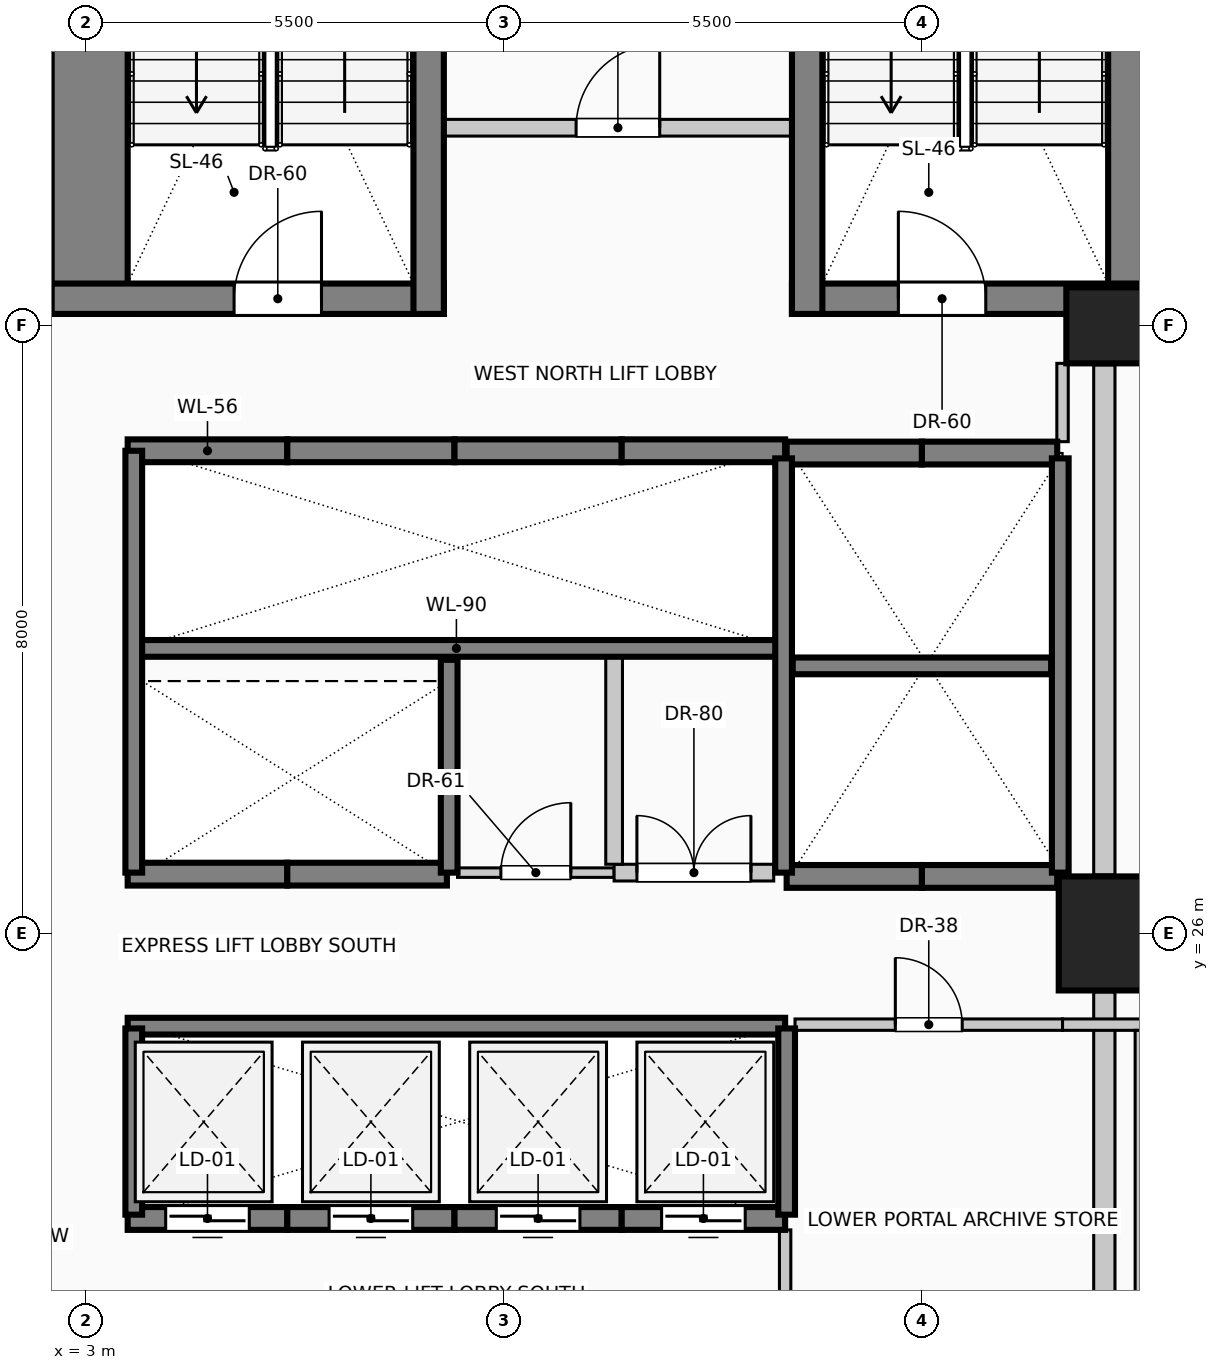
"""IFC4 building model, lengths in metres.
Left out: names, types, materials, properties, quantities, classifications, styles, units other than length and angle.
Written with IfcOpenShell. Run it as: python <this file> out.ifc"""

import sys

from ifc_helpers import new_model, si_unit, direction, frame, frame_2d, origin, origin_2d, place, context, subcontext, project, spatial, rectangle, circle, extrude, element, fill, save


model = new_model("IFC4")
c1 = context("Model", 3, precision=1e-05, world=origin(), true_north=direction((0.0, 1.0)))
c2 = subcontext(c1, "Body", "Model", "MODEL_VIEW")
j1 = project(units=[si_unit("LENGTHUNIT", "METRE"), si_unit("PLANEANGLEUNIT", "RADIAN")], contexts=[c1])
p1 = place(None, origin())
s1 = spatial("IfcSite", under=j1, at=p1, CompositionType="ELEMENT")
p2 = place(p1, origin())
s2 = spatial("IfcBuilding", under=s1, at=p2, CompositionType="ELEMENT")
p3 = place(p2, frame((0.0, 0.0, 30.6)))
s3 = spatial("IfcBuildingStorey", under=s2, at=p3, CompositionType="ELEMENT", Elevation=30.6)
for number, where, z_axis, x_axis in (
    (1, (3.05, 34.15, 0.0), (0.0, 0.0, 1.0), (0.0, 1.0, 0.0)),
    (2, (16.95, 34.15, 0.0), (0.0, 0.0, 1.0), (0.0, 1.0, 0.0)),
):
    element("IfcWall", number, at=place(p3, frame(where, z_axis=z_axis, x_axis=x_axis)), inside=s3, PredefinedType="SHEAR", context=c2, shape_type="SweptSolid", body=[
        extrude(rectangle(XDim=9.28, YDim=1.0, at=frame_2d((4.64, 0.0))), origin(), (0.0, 0.0, 1.0), 4.0),
    ])
p4 = place(p3, frame((2.55, 34.35, 0.0), z_axis=(0.0, 0.0, 1.0), x_axis=(1.0, 0.0, 0.0)))
e3 = element("IfcWall", 3, at=p4, inside=s3, PredefinedType="SHEAR", context=c2, shape_type="SweptSolid", body=[
    extrude(rectangle(XDim=5.16, YDim=0.4, at=frame_2d((2.58, 0.0))), origin(), (0.0, 0.0, 1.0), 4.0),
])
p5 = place(p4, frame((2.4, 0.0, 0.0)))
e4 = element("IfcOpeningElement", 4, at=p5, cuts=e3, PredefinedType="OPENING", context=c2, shape_type="SweptSolid", body=[
    extrude(rectangle(XDim=1.15, YDim=2.2, at=frame_2d((0.575, 1.1))), frame((0.0, 0.21, 0.0), z_axis=(0.0, -1.0, 0.0), x_axis=(1.0, 0.0, 0.0)), (0.0, 0.0, 1.0), 0.42),
])
p6 = place(p3, frame((12.29, 34.35, 0.0), z_axis=(0.0, 0.0, 1.0), x_axis=(1.0, 0.0, 0.0)))
e5 = element("IfcWall", 5, at=p6, inside=s3, PredefinedType="SHEAR", context=c2, shape_type="SweptSolid", body=[
    extrude(rectangle(XDim=5.16, YDim=0.4, at=frame_2d((2.58, 0.0))), origin(), (0.0, 0.0, 1.0), 4.0),
])
p7 = place(p6, frame((1.4, 0.0, 0.0)))
e6 = element("IfcOpeningElement", 6, at=p7, cuts=e5, PredefinedType="OPENING", context=c2, shape_type="SweptSolid", body=[
    extrude(rectangle(XDim=1.15, YDim=2.2, at=frame_2d((0.575, 1.1))), frame((0.0, 0.21, 0.0), z_axis=(0.0, -1.0, 0.0), x_axis=(1.0, 0.0, 0.0)), (0.0, 0.0, 1.0), 0.42),
])
for number, where, z_axis, x_axis in (
    (7, (7.51, 34.15, 0.0), (0.0, 0.0, 1.0), (0.0, 1.0, 0.0)),
    (8, (12.49, 34.15, 0.0), (0.0, 0.0, 1.0), (0.0, 1.0, 0.0)),
):
    element("IfcWall", number, at=place(p3, frame(where, z_axis=z_axis, x_axis=x_axis)), inside=s3, PredefinedType="SHEAR", context=c2, shape_type="SweptSolid", body=[
        extrude(rectangle(XDim=9.28, YDim=0.4, at=frame_2d((4.64, 0.0))), origin(), (0.0, 0.0, 1.0), 4.0),
    ])
p8 = place(p3, frame((16.4, 26.0, 0.0), z_axis=(0.0, 0.0, 1.0), x_axis=(1.0, 0.0, 0.0)))
e9 = element("IfcColumn", 9, at=p8, inside=s3, PredefinedType="COLUMN", context=c2, shape_type="SweptSolid", body=[
    extrude(rectangle(XDim=1.2, YDim=1.5, at=origin_2d()), origin(), (0.0, 0.0, 1.0), 4.0),
])
p9 = place(p3, frame((16.4, 34.0, 0.0), z_axis=(0.0, 0.0, 1.0), x_axis=(1.0, 0.0, 0.0)))
e10 = element("IfcColumn", 10, at=p9, inside=s3, PredefinedType="COLUMN", context=c2, shape_type="SweptSolid", body=[
    extrude(circle(Radius=0.5, at=origin_2d()), origin(), (0.0, 0.0, 1.0), 4.0),
])
p10 = place(p3, frame((16.4, 25.23, 0.0), z_axis=(0.0, 0.0, 1.0), x_axis=(0.0, -1.0, 0.0)))
e11 = element("IfcWall", 11, at=p10, inside=s3, PredefinedType="SOLIDWALL", context=c2, shape_type="SweptSolid", body=[
    extrude(rectangle(XDim=6.46, YDim=0.28, at=frame_2d((3.23, 0.0))), origin(), (0.0, 0.0, 1.0), 3.0),
])
p11 = place(p3, frame((16.4, 33.48, 0.0), z_axis=(0.0, 0.0, 1.0), x_axis=(0.0, -1.0, 0.0)))
e12 = element("IfcWall", 12, at=p11, inside=s3, PredefinedType="SOLIDWALL", context=c2, shape_type="SweptSolid", body=[
    extrude(rectangle(XDim=6.71, YDim=0.28, at=frame_2d((3.355, 0.0))), origin(), (0.0, 0.0, 1.0), 3.0),
])
p12 = place(p3, frame((5.65, 22.25, 0.0), z_axis=(0.0, 0.0, 1.0), x_axis=(-1.0, 0.0, 0.0)))
e13 = element("IfcWall", 13, at=p12, inside=s3, PredefinedType="SOLIDWALL", context=c2, shape_type="SweptSolid", body=[
    extrude(rectangle(XDim=2.1, YDim=0.3, at=frame_2d((1.05, 0.0))), origin(), (0.0, 0.0, 1.0), 4.0),
])
p13 = place(p12, frame((0.5, 0.0, 0.0)))
e14 = element("IfcOpeningElement", 14, at=p13, cuts=e13, PredefinedType="OPENING", context=c2, shape_type="SweptSolid", body=[
    extrude(rectangle(XDim=1.1, YDim=2.2, at=frame_2d((0.55, 1.1))), frame((0.0, 0.16, 0.0), z_axis=(0.0, -1.0, 0.0), x_axis=(1.0, 0.0, 0.0)), (0.0, 0.0, 1.0), 0.32),
])
p14 = place(p3, frame((7.85, 22.25, 0.0), z_axis=(0.0, 0.0, 1.0), x_axis=(-1.0, 0.0, 0.0)))
e15 = element("IfcWall", 15, at=p14, inside=s3, PredefinedType="SOLIDWALL", context=c2, shape_type="SweptSolid", body=[
    extrude(rectangle(XDim=2.2, YDim=0.3, at=frame_2d((1.1, 0.0))), origin(), (0.0, 0.0, 1.0), 4.0),
])
p15 = place(p14, frame((0.55, 0.0, 0.0)))
e16 = element("IfcOpeningElement", 16, at=p15, cuts=e15, PredefinedType="OPENING", context=c2, shape_type="SweptSolid", body=[
    extrude(rectangle(XDim=1.1, YDim=2.2, at=frame_2d((0.55, 1.1))), frame((0.0, 0.16, 0.0), z_axis=(0.0, -1.0, 0.0), x_axis=(1.0, 0.0, 0.0)), (0.0, 0.0, 1.0), 0.32),
])
p16 = place(p3, frame((10.05, 22.25, 0.0), z_axis=(0.0, 0.0, 1.0), x_axis=(-1.0, 0.0, 0.0)))
e17 = element("IfcWall", 17, at=p16, inside=s3, PredefinedType="SOLIDWALL", context=c2, shape_type="SweptSolid", body=[
    extrude(rectangle(XDim=2.2, YDim=0.3, at=frame_2d((1.1, 0.0))), origin(), (0.0, 0.0, 1.0), 4.0),
])
p17 = place(p16, frame((0.55, 0.0, 0.0)))
e18 = element("IfcOpeningElement", 18, at=p17, cuts=e17, PredefinedType="OPENING", context=c2, shape_type="SweptSolid", body=[
    extrude(rectangle(XDim=1.1, YDim=2.2, at=frame_2d((0.55, 1.1))), frame((0.0, 0.16, 0.0), z_axis=(0.0, -1.0, 0.0), x_axis=(1.0, 0.0, 0.0)), (0.0, 0.0, 1.0), 0.32),
])
p18 = place(p3, frame((12.2, 22.25, 0.0), z_axis=(0.0, 0.0, 1.0), x_axis=(-1.0, 0.0, 0.0)))
e19 = element("IfcWall", 19, at=p18, inside=s3, PredefinedType="SOLIDWALL", context=c2, shape_type="SweptSolid", body=[
    extrude(rectangle(XDim=2.15, YDim=0.3, at=frame_2d((1.075, 0.0))), origin(), (0.0, 0.0, 1.0), 4.0),
])
p19 = place(p18, frame((0.525, 0.0, 0.0)))
e20 = element("IfcOpeningElement", 20, at=p19, cuts=e19, PredefinedType="OPENING", context=c2, shape_type="SweptSolid", body=[
    extrude(rectangle(XDim=1.1, YDim=2.2, at=frame_2d((0.55, 1.1))), frame((0.0, 0.16, 0.0), z_axis=(0.0, -1.0, 0.0), x_axis=(1.0, 0.0, 0.0)), (0.0, 0.0, 1.0), 0.32),
])
for number, where, z_axis, x_axis in (
    (21, (14.0, 26.75, 0.0), (0.0, 0.0, 1.0), (-1.0, 0.0, 0.0)),
    (22, (15.78, 26.75, 0.0), (0.0, 0.0, 1.0), (-1.0, 0.0, 0.0)),
    (23, (12.22, 32.32, 0.0), (0.0, 0.0, 1.0), (1.0, 0.0, 0.0)),
    (24, (14.0, 32.32, 0.0), (0.0, 0.0, 1.0), (1.0, 0.0, 0.0)),
):
    element("IfcWall", number, at=place(p3, frame(where, z_axis=z_axis, x_axis=x_axis)), inside=s3, PredefinedType="SOLIDWALL", context=c2, shape_type="SweptSolid", body=[
        extrude(rectangle(XDim=1.78, YDim=0.3, at=frame_2d((0.89, 0.0))), origin(), (0.0, 0.0, 1.0), 4.0),
    ])
p20 = place(p3, frame((3.55, 32.35, 0.0), z_axis=(0.0, 0.0, 1.0), x_axis=(1.0, 0.0, 0.0)))
e25 = element("IfcWall", 25, at=p20, inside=s3, PredefinedType="SOLIDWALL", context=c2, shape_type="SweptSolid", body=[
    extrude(rectangle(XDim=2.1, YDim=0.3, at=frame_2d((1.05, 0.0))), origin(), (0.0, 0.0, 1.0), 4.0),
])
p21 = place(p3, frame((5.65, 32.35, 0.0), z_axis=(0.0, 0.0, 1.0), x_axis=(1.0, 0.0, 0.0)))
e26 = element("IfcWall", 26, at=p21, inside=s3, PredefinedType="SOLIDWALL", context=c2, shape_type="SweptSolid", body=[
    extrude(rectangle(XDim=2.2, YDim=0.3, at=frame_2d((1.1, 0.0))), origin(), (0.0, 0.0, 1.0), 4.0),
])
p22 = place(p3, frame((7.85, 32.35, 0.0), z_axis=(0.0, 0.0, 1.0), x_axis=(1.0, 0.0, 0.0)))
e27 = element("IfcWall", 27, at=p22, inside=s3, PredefinedType="SOLIDWALL", context=c2, shape_type="SweptSolid", body=[
    extrude(rectangle(XDim=2.2, YDim=0.3, at=frame_2d((1.1, 0.0))), origin(), (0.0, 0.0, 1.0), 4.0),
])
p23 = place(p3, frame((10.05, 32.35, 0.0), z_axis=(0.0, 0.0, 1.0), x_axis=(1.0, 0.0, 0.0)))
e28 = element("IfcWall", 28, at=p23, inside=s3, PredefinedType="SOLIDWALL", context=c2, shape_type="SweptSolid", body=[
    extrude(rectangle(XDim=2.15, YDim=0.3, at=frame_2d((1.075, 0.0))), origin(), (0.0, 0.0, 1.0), 4.0),
])
p24 = place(p3, frame((5.65, 26.78, 0.0), z_axis=(0.0, 0.0, 1.0), x_axis=(-1.0, 0.0, 0.0)))
e29 = element("IfcWall", 29, at=p24, inside=s3, PredefinedType="SOLIDWALL", context=c2, shape_type="SweptSolid", body=[
    extrude(rectangle(XDim=2.1, YDim=0.3, at=frame_2d((1.05, 0.0))), origin(), (0.0, 0.0, 1.0), 4.0),
])
p25 = place(p3, frame((7.75, 26.78, 0.0), z_axis=(0.0, 0.0, 1.0), x_axis=(-1.0, 0.0, 0.0)))
e30 = element("IfcWall", 30, at=p25, inside=s3, PredefinedType="SOLIDWALL", context=c2, shape_type="SweptSolid", body=[
    extrude(rectangle(XDim=2.1, YDim=0.3, at=frame_2d((1.05, 0.0))), origin(), (0.0, 0.0, 1.0), 4.0),
])
p26 = place(p3, frame((3.55, 29.75, 0.0), z_axis=(0.0, 0.0, 1.0), x_axis=(1.0, 0.0, 0.0)))
e31 = element("IfcWall", 31, at=p26, inside=s3, PredefinedType="SOLIDWALL", context=c2, shape_type="SweptSolid", body=[
    extrude(rectangle(XDim=8.65, YDim=0.22, at=frame_2d((4.325, 0.0))), origin(), (0.0, 0.0, 1.0), 4.0),
])
p27 = place(p3, frame((3.63, 26.8, 0.0), z_axis=(0.0, 0.0, 1.0), x_axis=(0.0, 1.0, 0.0)))
e32 = element("IfcWall", 32, at=p27, inside=s3, PredefinedType="SOLIDWALL", context=c2, shape_type="SweptSolid", body=[
    extrude(rectangle(XDim=5.55, YDim=0.22, at=frame_2d((2.775, 0.0))), origin(), (0.0, 0.0, 1.0), 4.0),
])
p28 = place(p3, frame((7.78, 26.8, 0.0), z_axis=(0.0, 0.0, 1.0), x_axis=(0.0, 1.0, 0.0)))
e33 = element("IfcWall", 33, at=p28, inside=s3, PredefinedType="SOLIDWALL", context=c2, shape_type="SweptSolid", body=[
    extrude(rectangle(XDim=2.8, YDim=0.22, at=frame_2d((1.4, 0.0))), origin(), (0.0, 0.0, 1.0), 4.0),
])
for number, where, z_axis, x_axis in (
    (34, (12.18, 26.8, 0.0), (0.0, 0.0, 1.0), (0.0, 1.0, 0.0)),
    (35, (15.82, 26.8, 0.0), (0.0, 0.0, 1.0), (0.0, 1.0, 0.0)),
):
    element("IfcWall", number, at=place(p3, frame(where, z_axis=z_axis, x_axis=x_axis)), inside=s3, PredefinedType="SOLIDWALL", context=c2, shape_type="SweptSolid", body=[
        extrude(rectangle(XDim=5.45, YDim=0.22, at=frame_2d((2.725, 0.0))), origin(), (0.0, 0.0, 1.0), 4.0),
    ])
p29 = place(p3, frame((12.3, 29.52, 0.0), z_axis=(0.0, 0.0, 1.0), x_axis=(1.0, 0.0, 0.0)))
e36 = element("IfcWall", 36, at=p29, inside=s3, PredefinedType="SOLIDWALL", context=c2, shape_type="SweptSolid", body=[
    extrude(rectangle(XDim=3.4, YDim=0.22, at=frame_2d((1.7, 0.0))), origin(), (0.0, 0.0, 1.0), 4.0),
])
p30 = place(p3, frame((3.55, 24.78, 0.0), z_axis=(0.0, 0.0, 1.0), x_axis=(1.0, 0.0, 0.0)))
e37 = element("IfcWall", 37, at=p30, inside=s3, PredefinedType="SOLIDWALL", context=c2, shape_type="SweptSolid", body=[
    extrude(rectangle(XDim=8.65, YDim=0.22, at=frame_2d((4.325, 0.0))), origin(), (0.0, 0.0, 1.0), 4.0),
])
for number, where, z_axis, x_axis in (
    (38, (3.63, 22.3, 0.0), (0.0, 0.0, 1.0), (0.0, 1.0, 0.0)),
    (39, (12.22, 22.3, 0.0), (0.0, 0.0, 1.0), (0.0, 1.0, 0.0)),
):
    element("IfcWall", number, at=place(p3, frame(where, z_axis=z_axis, x_axis=x_axis)), inside=s3, PredefinedType="SOLIDWALL", context=c2, shape_type="SweptSolid", body=[
        extrude(rectangle(XDim=2.45, YDim=0.22, at=frame_2d((1.225, 0.0))), origin(), (0.0, 0.0, 1.0), 4.0),
    ])
p31 = place(p3, frame((7.51, 36.6, 0.0), z_axis=(0.0, 0.0, 1.0), x_axis=(1.0, 0.0, 0.0)))
e40 = element("IfcWall", 40, at=p31, inside=s3, PredefinedType="PARTITIONING", context=c2, shape_type="SweptSolid", body=[
    extrude(rectangle(XDim=4.98, YDim=0.22, at=frame_2d((2.49, 0.0))), origin(), (0.0, 0.0, 1.0), 3.7),
])
p32 = place(p31, frame((1.94, 0.0, 0.0)))
e41 = element("IfcOpeningElement", 41, at=p32, cuts=e40, PredefinedType="OPENING", context=c2, shape_type="SweptSolid", body=[
    extrude(rectangle(XDim=1.1, YDim=2.2, at=frame_2d((0.55, 1.1))), frame((0.0, 0.12, 0.0), z_axis=(0.0, -1.0, 0.0), x_axis=(1.0, 0.0, 0.0)), (0.0, 0.0, 1.0), 0.24),
])
p33 = place(p3, frame((12.33, 24.8, 0.0), z_axis=(0.0, 0.0, 1.0), x_axis=(1.0, 0.0, 0.0)))
e42 = element("IfcWall", 42, at=p33, inside=s3, PredefinedType="PARTITIONING", context=c2, shape_type="SweptSolid", body=[
    extrude(rectangle(XDim=3.52, YDim=0.15, at=frame_2d((1.76, 0.0))), origin(), (0.0, 0.0, 1.0), 3.7),
])
p34 = place(p33, frame((1.32, 0.0, 0.0)))
e43 = element("IfcOpeningElement", 43, at=p34, cuts=e42, PredefinedType="OPENING", context=c2, shape_type="SweptSolid", body=[
    extrude(rectangle(XDim=0.88, YDim=2.1, at=frame_2d((0.44, 1.05))), frame((0.0, 0.085, 0.0), z_axis=(0.0, -1.0, 0.0), x_axis=(1.0, 0.0, 0.0)), (0.0, 0.0, 1.0), 0.17),
])
p35 = place(p3, frame((15.85, 24.8, 0.0), z_axis=(0.0, 0.0, 1.0), x_axis=(1.0, 0.0, 0.0)))
e44 = element("IfcWall", 44, at=p35, inside=s3, PredefinedType="PARTITIONING", context=c2, shape_type="SweptSolid", body=[
    extrude(rectangle(XDim=1.03, YDim=0.15, at=frame_2d((0.515, 0.0))), origin(), (0.0, 0.0, 1.0), 3.7),
])
p36 = place(p3, frame((7.89, 26.8, 0.0), z_axis=(0.0, 0.0, 1.0), x_axis=(1.0, 0.0, 0.0)))
e45 = element("IfcWall", 45, at=p36, inside=s3, PredefinedType="PARTITIONING", context=c2, shape_type="SweptSolid", body=[
    extrude(rectangle(XDim=2.06, YDim=0.125, at=frame_2d((1.03, 0.0))), origin(), (0.0, 0.0, 1.0), 3.7),
])
p37 = place(p36, frame((0.57, 0.0, 0.0)))
e46 = element("IfcOpeningElement", 46, at=p37, cuts=e45, PredefinedType="OPENING", context=c2, shape_type="SweptSolid", body=[
    extrude(rectangle(XDim=0.92, YDim=2.1, at=frame_2d((0.46, 1.05))), frame((0.0, 0.073, 0.0), z_axis=(0.0, -1.0, 0.0), x_axis=(1.0, 0.0, 0.0)), (0.0, 0.0, 1.0), 0.145),
])
p38 = place(p3, frame((9.95, 26.8, 0.0), z_axis=(0.0, 0.0, 1.0), x_axis=(1.0, 0.0, 0.0)))
e47 = element("IfcWall", 47, at=p38, inside=s3, PredefinedType="PARTITIONING", context=c2, shape_type="SweptSolid", body=[
    extrude(rectangle(XDim=2.1, YDim=0.22, at=frame_2d((1.05, 0.0))), origin(), (0.0, 0.0, 1.0), 3.7),
])
p39 = place(p38, frame((0.3, 0.0, 0.0)))
e48 = element("IfcOpeningElement", 48, at=p39, cuts=e47, PredefinedType="OPENING", context=c2, shape_type="SweptSolid", body=[
    extrude(rectangle(XDim=1.5, YDim=2.25, at=frame_2d((0.75, 1.125))), frame((0.0, 0.12, 0.0), z_axis=(0.0, -1.0, 0.0), x_axis=(1.0, 0.0, 0.0)), (0.0, 0.0, 1.0), 0.24),
])
p40 = place(p3, frame((9.95, 26.91, 0.0), z_axis=(0.0, 0.0, 1.0), x_axis=(0.0, 1.0, 0.0)))
e49 = element("IfcWall", 49, at=p40, inside=s3, PredefinedType="PARTITIONING", context=c2, shape_type="SweptSolid", body=[
    extrude(rectangle(XDim=2.73, YDim=0.22, at=frame_2d((1.365, 0.0))), origin(), (0.0, 0.0, 1.0), 3.7),
])
p41 = place(p3, frame((12.2, 20.275, 0.0), z_axis=(0.0, 0.0, 1.0), x_axis=(0.0, 1.0, 0.0)))
e50 = element("IfcWall", 50, at=p41, inside=s3, PredefinedType="PARTITIONING", context=c2, shape_type="SweptSolid", body=[
    extrude(rectangle(XDim=1.825, YDim=0.15, at=frame_2d((0.913, 0.0))), origin(), (0.0, 0.0, 1.0), 3.7),
])
p42 = place(p3, frame((15.85, 32.47, 0.0), z_axis=(0.0, 0.0, 1.0), x_axis=(0.0, 1.0, 0.0)))
e51 = element("IfcWall", 51, at=p42, inside=s3, PredefinedType="PARTITIONING", context=c2, shape_type="SweptSolid", body=[
    extrude(rectangle(XDim=1.03, YDim=0.15, at=frame_2d((0.515, 0.0))), origin(), (0.0, 0.0, 1.0), 3.7),
])
p43 = place(p3, frame((16.88, 20.275, 0.0), z_axis=(0.0, 0.0, 1.0), x_axis=(0.0, 1.0, 0.0)))
e52 = element("IfcWall", 52, at=p43, inside=s3, PredefinedType="PARTITIONING", context=c2, shape_type="SweptSolid", body=[
    extrude(rectangle(XDim=4.45, YDim=0.15, at=frame_2d((2.225, 0.0))), origin(), (0.0, 0.0, 1.0), 3.7),
])
p44 = place(p13, origin())
e53 = element("IfcDoor", 53, at=p44, inside=s3, OperationType="SLIDING_TO_LEFT", PredefinedType="DOOR", context=c2, shape_type="SweptSolid", body=[
    extrude(rectangle(XDim=1.1, YDim=2.2, at=frame_2d((0.55, 1.1))), frame((0.0, 0.025, 0.0), z_axis=(0.0, -1.0, 0.0), x_axis=(1.0, 0.0, 0.0)), (0.0, 0.0, 1.0), 0.05),
])
fill(e14, e53)
p45 = place(p15, origin())
e54 = element("IfcDoor", 54, at=p45, inside=s3, OperationType="SLIDING_TO_RIGHT", PredefinedType="DOOR", context=c2, shape_type="SweptSolid", body=[
    extrude(rectangle(XDim=1.1, YDim=2.2, at=frame_2d((0.55, 1.1))), frame((0.0, 0.025, 0.0), z_axis=(0.0, -1.0, 0.0), x_axis=(1.0, 0.0, 0.0)), (0.0, 0.0, 1.0), 0.05),
])
fill(e16, e54)
p46 = place(p17, origin())
e55 = element("IfcDoor", 55, at=p46, inside=s3, OperationType="SLIDING_TO_LEFT", PredefinedType="DOOR", context=c2, shape_type="SweptSolid", body=[
    extrude(rectangle(XDim=1.1, YDim=2.2, at=frame_2d((0.55, 1.1))), frame((0.0, 0.025, 0.0), z_axis=(0.0, -1.0, 0.0), x_axis=(1.0, 0.0, 0.0)), (0.0, 0.0, 1.0), 0.05),
])
fill(e18, e55)
p47 = place(p19, origin())
e56 = element("IfcDoor", 56, at=p47, inside=s3, OperationType="SLIDING_TO_RIGHT", PredefinedType="DOOR", context=c2, shape_type="SweptSolid", body=[
    extrude(rectangle(XDim=1.1, YDim=2.2, at=frame_2d((0.55, 1.1))), frame((0.0, 0.025, 0.0), z_axis=(0.0, -1.0, 0.0), x_axis=(1.0, 0.0, 0.0)), (0.0, 0.0, 1.0), 0.05),
])
fill(e20, e56)
p48 = place(p5, origin())
e57 = element("IfcDoor", 57, at=p48, inside=s3, OperationType="SINGLE_SWING_RIGHT", PredefinedType="DOOR", context=c2, shape_type="SweptSolid", body=[
    extrude(rectangle(XDim=1.15, YDim=2.2, at=frame_2d((0.575, 1.1))), frame((0.0, 0.025, 0.0), z_axis=(0.0, -1.0, 0.0), x_axis=(1.0, 0.0, 0.0)), (0.0, 0.0, 1.0), 0.05),
])
fill(e4, e57)
p49 = place(p7, origin())
e58 = element("IfcDoor", 58, at=p49, inside=s3, OperationType="SINGLE_SWING_LEFT", PredefinedType="DOOR", context=c2, shape_type="SweptSolid", body=[
    extrude(rectangle(XDim=1.15, YDim=2.2, at=frame_2d((0.575, 1.1))), frame((0.0, 0.025, 0.0), z_axis=(0.0, -1.0, 0.0), x_axis=(1.0, 0.0, 0.0)), (0.0, 0.0, 1.0), 0.05),
])
fill(e6, e58)
p50 = place(p32, origin())
e59 = element("IfcDoor", 59, at=p50, inside=s3, OperationType="SINGLE_SWING_RIGHT", PredefinedType="DOOR", context=c2, shape_type="SweptSolid", body=[
    extrude(rectangle(XDim=1.1, YDim=2.2, at=frame_2d((0.55, 1.1))), frame((0.0, 0.025, 0.0), z_axis=(0.0, -1.0, 0.0), x_axis=(1.0, 0.0, 0.0)), (0.0, 0.0, 1.0), 0.05),
])
fill(e41, e59)
p51 = place(p34, origin())
e60 = element("IfcDoor", 60, at=p51, inside=s3, OperationType="SINGLE_SWING_LEFT", PredefinedType="DOOR", context=c2, shape_type="SweptSolid", body=[
    extrude(rectangle(XDim=0.88, YDim=2.1, at=frame_2d((0.44, 1.05))), frame((0.0, 0.025, 0.0), z_axis=(0.0, -1.0, 0.0), x_axis=(1.0, 0.0, 0.0)), (0.0, 0.0, 1.0), 0.05),
])
fill(e43, e60)
p52 = place(p37, origin())
e61 = element("IfcDoor", 61, at=p52, inside=s3, OperationType="SINGLE_SWING_RIGHT", PredefinedType="DOOR", context=c2, shape_type="SweptSolid", body=[
    extrude(rectangle(XDim=0.92, YDim=2.1, at=frame_2d((0.46, 1.05))), frame((0.0, 0.025, 0.0), z_axis=(0.0, -1.0, 0.0), x_axis=(1.0, 0.0, 0.0)), (0.0, 0.0, 1.0), 0.05),
])
fill(e46, e61)
p53 = place(p39, origin())
e62 = element("IfcDoor", 62, at=p53, inside=s3, OperationType="DOUBLE_DOOR_SINGLE_SWING", PredefinedType="DOOR", context=c2, shape_type="SweptSolid", body=[
    extrude(rectangle(XDim=1.5, YDim=2.25, at=frame_2d((0.75, 1.125))), frame((0.0, 0.025, 0.0), z_axis=(0.0, -1.0, 0.0), x_axis=(1.0, 0.0, 0.0)), (0.0, 0.0, 1.0), 0.05),
])
fill(e48, e62)
save(model, sys.argv[1])
